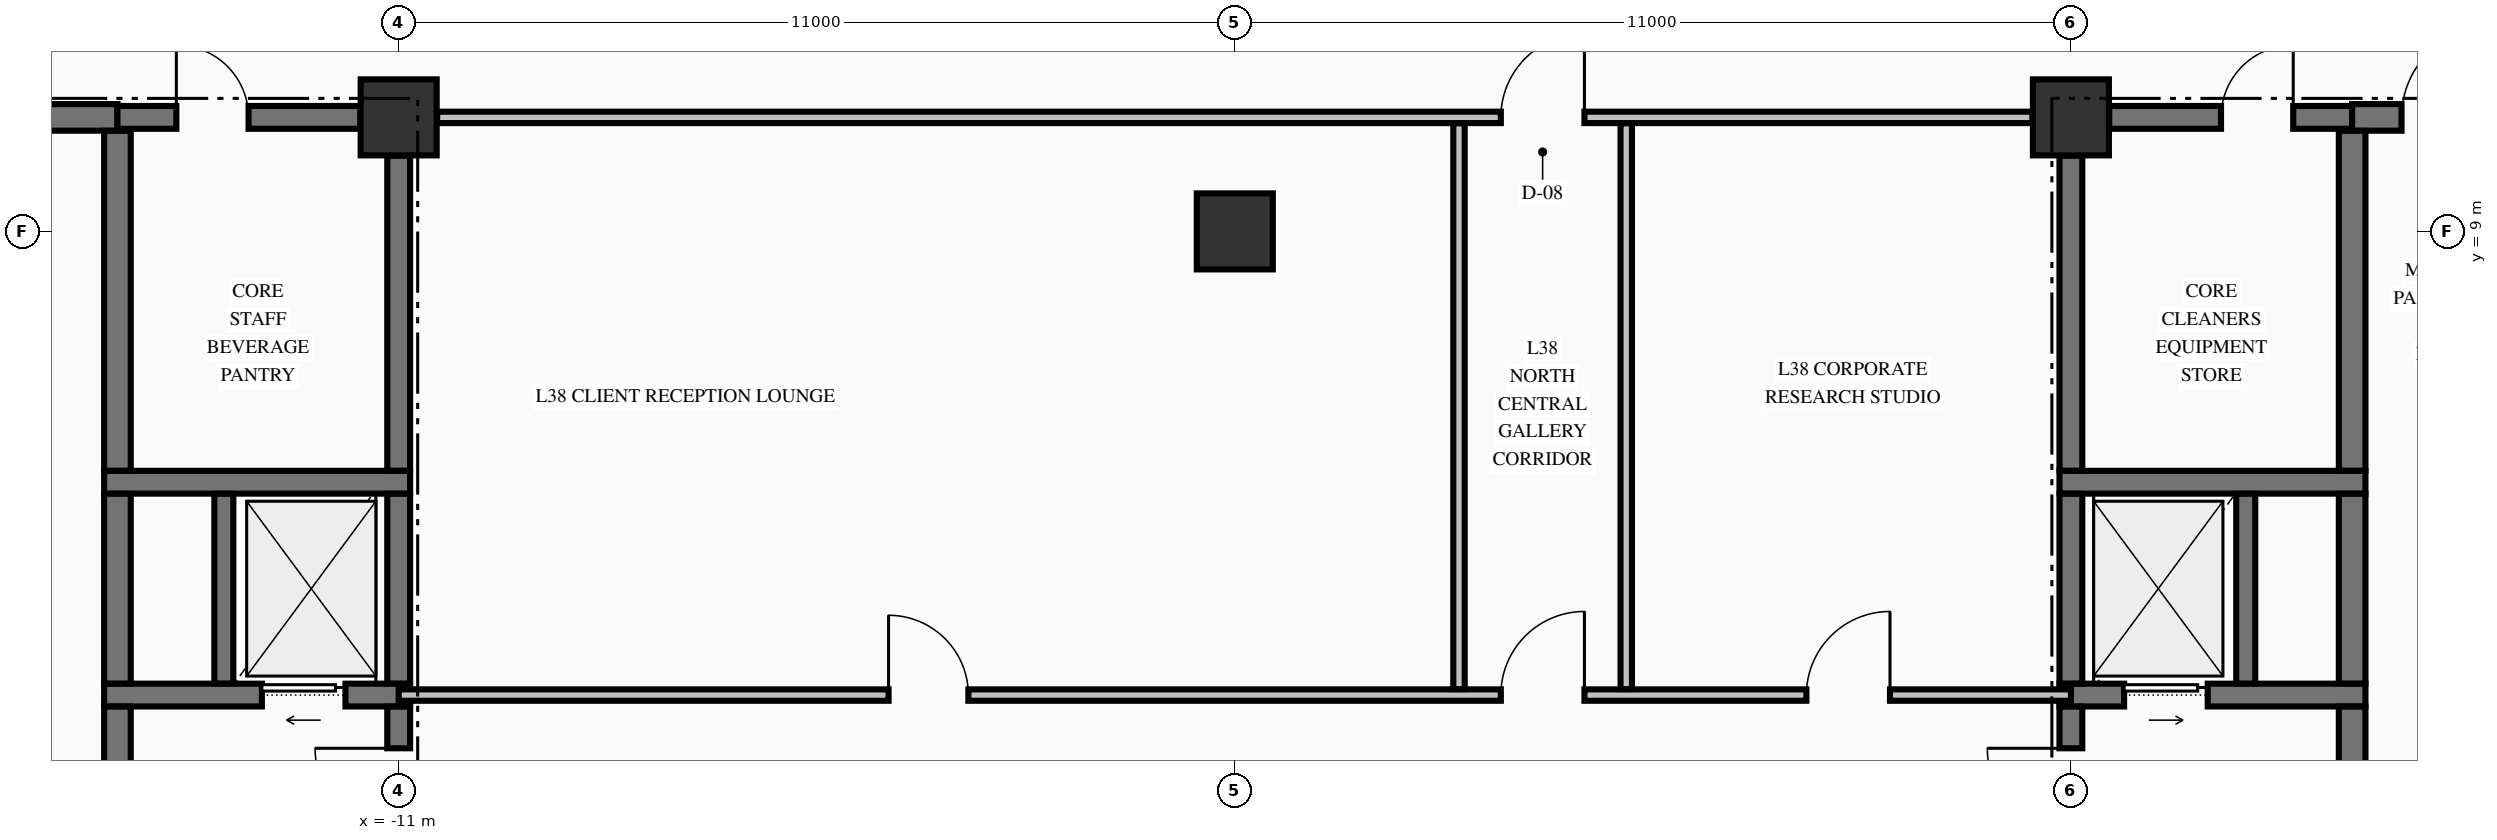
"""IFC4 building model, lengths in metres.
Left out: names, types, materials, properties, quantities, classifications, styles, units other than length and angle.
Written with IfcOpenShell. Run it as: python <this file> out.ifc"""

import sys

from ifc_helpers import new_model, si_unit, direction, frame, frame_2d, origin, origin_2d, place, context, subcontext, project, spatial, rectangle, extrude, element, fill, save


model = new_model("IFC4")
c1 = context("Model", 3, precision=1e-05, world=origin(), true_north=direction((0.0, 1.0)))
c2 = subcontext(c1, "Body", "Model", "MODEL_VIEW")
j1 = project(units=[si_unit("LENGTHUNIT", "METRE"), si_unit("PLANEANGLEUNIT", "RADIAN")], contexts=[c1])
p1 = place(None, origin())
s1 = spatial("IfcSite", under=j1, at=p1, CompositionType="ELEMENT")
p2 = place(p1, origin())
s2 = spatial("IfcBuilding", under=s1, at=p2, CompositionType="ELEMENT")
p3 = place(p2, frame((0.0, 0.0, 149.91)))
s3 = spatial("IfcBuildingStorey", under=s2, at=p3, CompositionType="ELEMENT", Elevation=149.91)
for number, where, z_axis, x_axis in (
    (1, (-11.0, 10.5, -0.25), (0.0, 0.0, 1.0), (1.0, 0.0, 0.0)),
    (2, (11.0, 10.5, -0.25), (0.0, 0.0, 1.0), (1.0, 0.0, 0.0)),
    (3, (0.0, 9.0, -0.25), (0.0, 0.0, 1.0), (1.0, 0.0, 0.0)),
):
    element("IfcColumn", number, at=place(p3, frame(where, z_axis=z_axis, x_axis=x_axis)), inside=s3, PredefinedType="COLUMN", context=c2, shape_type="SweptSolid", body=[
        extrude(rectangle(XDim=1.0, YDim=1.0, at=origin_2d()), origin(), (0.0, 0.0, 1.0), 3.395),
    ])
p4 = place(p3, frame((-14.875, 2.9, 0.0), z_axis=(0.0, 0.0, 1.0), x_axis=(1.0, 0.0, 0.0)))
e4 = element("IfcWall", 4, at=p4, inside=s3, PredefinedType="SHEAR", context=c2, shape_type="SweptSolid", body=[
    extrude(rectangle(XDim=4.025, YDim=0.3, at=frame_2d((2.012, 0.0))), origin(), (0.0, 0.0, 1.0), 3.145),
])
p5 = place(p4, frame((2.075, 0.0, 0.0)))
e5 = element("IfcOpeningElement", 5, at=p5, cuts=e4, PredefinedType="OPENING", context=c2, shape_type="SweptSolid", body=[
    extrude(rectangle(XDim=1.1, YDim=2.2, at=frame_2d((0.55, 1.1))), frame((0.0, 0.16, 0.0), z_axis=(0.0, -1.0, 0.0), x_axis=(1.0, 0.0, 0.0)), (0.0, 0.0, 1.0), 0.32),
])
p6 = place(p3, frame((10.85, 2.9, 0.0), z_axis=(0.0, 0.0, 1.0), x_axis=(1.0, 0.0, 0.0)))
e6 = element("IfcWall", 6, at=p6, inside=s3, PredefinedType="SHEAR", context=c2, shape_type="SweptSolid", body=[
    extrude(rectangle(XDim=4.025, YDim=0.3, at=frame_2d((2.012, 0.0))), origin(), (0.0, 0.0, 1.0), 3.145),
])
p7 = place(p6, frame((0.85, 0.0, 0.0)))
e7 = element("IfcOpeningElement", 7, at=p7, cuts=e6, PredefinedType="OPENING", context=c2, shape_type="SweptSolid", body=[
    extrude(rectangle(XDim=1.1, YDim=2.2, at=frame_2d((0.55, 1.1))), frame((0.0, 0.16, 0.0), z_axis=(0.0, -1.0, 0.0), x_axis=(1.0, 0.0, 0.0)), (0.0, 0.0, 1.0), 0.32),
])
for number, where, z_axis, x_axis in (
    (8, (-14.875, 5.7, 0.0), (0.0, 0.0, 1.0), (1.0, 0.0, 0.0)),
    (9, (10.85, 5.7, 0.0), (0.0, 0.0, 1.0), (1.0, 0.0, 0.0)),
):
    element("IfcWall", number, at=place(p3, frame(where, z_axis=z_axis, x_axis=x_axis)), inside=s3, PredefinedType="SHEAR", context=c2, shape_type="SweptSolid", body=[
        extrude(rectangle(XDim=4.025, YDim=0.3, at=frame_2d((2.012, 0.0))), origin(), (0.0, 0.0, 1.0), 3.145),
    ])
p8 = place(p3, frame((-19.496, 10.5, 0.0), z_axis=(0.0, 0.0, 1.0), x_axis=(1.0, 0.0, 0.0)))
e10 = element("IfcWall", 10, at=p8, inside=s3, PredefinedType="SHEAR", context=c2, shape_type="SweptSolid", body=[
    extrude(rectangle(XDim=4.796, YDim=0.35, at=frame_2d((2.398, 0.0))), origin(), (0.0, 0.0, 1.0), 3.145),
])
p9 = place(p8, frame((1.621, 0.0, 0.0)))
e11 = element("IfcOpeningElement", 11, at=p9, cuts=e10, PredefinedType="OPENING", context=c2, shape_type="SweptSolid", body=[
    extrude(rectangle(XDim=1.05, YDim=2.15, at=frame_2d((0.525, 1.075))), frame((0.0, 0.185, 0.0), z_axis=(0.0, -1.0, 0.0), x_axis=(1.0, 0.0, 0.0)), (0.0, 0.0, 1.0), 0.37),
])
p10 = place(p3, frame((-14.7, 10.5, 0.0), z_axis=(0.0, 0.0, 1.0), x_axis=(1.0, 0.0, 0.0)))
e12 = element("IfcWall", 12, at=p10, inside=s3, PredefinedType="SHEAR", context=c2, shape_type="SweptSolid", body=[
    extrude(rectangle(XDim=3.196, YDim=0.3, at=frame_2d((1.598, 0.0))), origin(), (0.0, 0.0, 1.0), 3.145),
])
p11 = place(p10, frame((0.775, 0.0, 0.0)))
e13 = element("IfcOpeningElement", 13, at=p11, cuts=e12, PredefinedType="OPENING", context=c2, shape_type="SweptSolid", body=[
    extrude(rectangle(XDim=0.95, YDim=2.15, at=frame_2d((0.475, 1.075))), frame((0.0, 0.16, 0.0), z_axis=(0.0, -1.0, 0.0), x_axis=(1.0, 0.0, 0.0)), (0.0, 0.0, 1.0), 0.32),
])
p12 = place(p3, frame((11.504, 10.5, 0.0), z_axis=(0.0, 0.0, 1.0), x_axis=(1.0, 0.0, 0.0)))
e14 = element("IfcWall", 14, at=p12, inside=s3, PredefinedType="SHEAR", context=c2, shape_type="SweptSolid", body=[
    extrude(rectangle(XDim=3.196, YDim=0.3, at=frame_2d((1.598, 0.0))), origin(), (0.0, 0.0, 1.0), 3.145),
])
p13 = place(p12, frame((1.471, 0.0, 0.0)))
e15 = element("IfcOpeningElement", 15, at=p13, cuts=e14, PredefinedType="OPENING", context=c2, shape_type="SweptSolid", body=[
    extrude(rectangle(XDim=0.95, YDim=2.15, at=frame_2d((0.475, 1.075))), frame((0.0, 0.16, 0.0), z_axis=(0.0, -1.0, 0.0), x_axis=(1.0, 0.0, 0.0)), (0.0, 0.0, 1.0), 0.32),
])
p14 = place(p3, frame((14.7, 10.5, 0.0), z_axis=(0.0, 0.0, 1.0), x_axis=(1.0, 0.0, 0.0)))
e16 = element("IfcWall", 16, at=p14, inside=s3, PredefinedType="SHEAR", context=c2, shape_type="SweptSolid", body=[
    extrude(rectangle(XDim=4.796, YDim=0.35, at=frame_2d((2.398, 0.0))), origin(), (0.0, 0.0, 1.0), 3.145),
])
p15 = place(p14, frame((0.65, 0.0, 0.0)))
e17 = element("IfcOpeningElement", 17, at=p15, cuts=e16, PredefinedType="OPENING", context=c2, shape_type="SweptSolid", body=[
    extrude(rectangle(XDim=1.2, YDim=2.15, at=frame_2d((0.6, 1.075))), frame((0.0, 0.185, 0.0), z_axis=(0.0, -1.0, 0.0), x_axis=(1.0, 0.0, 0.0)), (0.0, 0.0, 1.0), 0.37),
])
p16 = place(p14, frame((3.25, 0.0, 0.0)))
e18 = element("IfcOpeningElement", 18, at=p16, cuts=e16, PredefinedType="OPENING", context=c2, shape_type="SweptSolid", body=[
    extrude(rectangle(XDim=0.9, YDim=2.15, at=frame_2d((0.45, 1.075))), frame((0.0, 0.185, 0.0), z_axis=(0.0, -1.0, 0.0), x_axis=(1.0, 0.0, 0.0)), (0.0, 0.0, 1.0), 0.37),
])
p17 = place(p3, frame((-11.0, 2.9, 0.0), z_axis=(0.0, 0.0, 1.0), x_axis=(1.0, 0.0, 0.0)))
e19 = element("IfcWall", 19, at=p17, inside=s3, PredefinedType="PARTITIONING", context=c2, shape_type="SweptSolid", body=[
    extrude(rectangle(XDim=22.0, YDim=0.15, at=frame_2d((11.0, 0.0))), origin(), (0.0, 0.0, 1.0), 3.145),
])
p18 = place(p17, frame((14.5, 0.0, 0.0)))
e20 = element("IfcOpeningElement", 20, at=p18, cuts=e19, PredefinedType="OPENING", context=c2, shape_type="SweptSolid", body=[
    extrude(rectangle(XDim=1.1, YDim=2.15, at=frame_2d((0.55, 1.075))), frame((0.0, 0.085, 0.0), z_axis=(0.0, -1.0, 0.0), x_axis=(1.0, 0.0, 0.0)), (0.0, 0.0, 1.0), 0.17),
])
p19 = place(p17, frame((6.445, 0.0, 0.0)))
e21 = element("IfcOpeningElement", 21, at=p19, cuts=e19, PredefinedType="OPENING", context=c2, shape_type="SweptSolid", body=[
    extrude(rectangle(XDim=1.05, YDim=2.15, at=frame_2d((0.525, 1.075))), frame((0.0, 0.085, 0.0), z_axis=(0.0, -1.0, 0.0), x_axis=(1.0, 0.0, 0.0)), (0.0, 0.0, 1.0), 0.17),
])
p20 = place(p17, frame((18.52, 0.0, 0.0)))
e22 = element("IfcOpeningElement", 22, at=p20, cuts=e19, PredefinedType="OPENING", context=c2, shape_type="SweptSolid", body=[
    extrude(rectangle(XDim=1.1, YDim=2.15, at=frame_2d((0.55, 1.075))), frame((0.0, 0.085, 0.0), z_axis=(0.0, -1.0, 0.0), x_axis=(1.0, 0.0, 0.0)), (0.0, 0.0, 1.0), 0.17),
])
p21 = place(p3, frame((-10.494, 10.5, 0.0), z_axis=(0.0, 0.0, 1.0), x_axis=(1.0, 0.0, 0.0)))
e23 = element("IfcWall", 23, at=p21, inside=s3, PredefinedType="PARTITIONING", context=c2, shape_type="SweptSolid", body=[
    extrude(rectangle(XDim=20.988, YDim=0.15, at=frame_2d((10.494, 0.0))), origin(), (0.0, 0.0, 1.0), 3.145),
])
p22 = place(p21, frame((13.994, 0.0, 0.0)))
e24 = element("IfcOpeningElement", 24, at=p22, cuts=e23, PredefinedType="OPENING", context=c2, shape_type="SweptSolid", body=[
    extrude(rectangle(XDim=1.1, YDim=2.15, at=frame_2d((0.55, 1.075))), frame((0.0, 0.085, 0.0), z_axis=(0.0, -1.0, 0.0), x_axis=(1.0, 0.0, 0.0)), (0.0, 0.0, 1.0), 0.17),
])
p23 = place(p3, frame((-14.7, -0.098, 0.0), z_axis=(0.0, 0.0, 1.0), x_axis=(0.0, 1.0, 0.0)))
e25 = element("IfcWall", 25, at=p23, inside=s3, PredefinedType="SHEAR", context=c2, shape_type="SweptSolid", body=[
    extrude(rectangle(XDim=2.846, YDim=0.35, at=frame_2d((1.423, 0.0))), origin(), (0.0, 0.0, 1.0), 3.145),
])
p24 = place(p3, frame((-14.7, 3.052, 0.0), z_axis=(0.0, 0.0, 1.0), x_axis=(0.0, 1.0, 0.0)))
e26 = element("IfcWall", 26, at=p24, inside=s3, PredefinedType="SHEAR", context=c2, shape_type="SweptSolid", body=[
    extrude(rectangle(XDim=2.496, YDim=0.35, at=frame_2d((1.248, 0.0))), origin(), (0.0, 0.0, 1.0), 3.145),
])
p25 = place(p3, frame((-14.7, 5.852, 0.0), z_axis=(0.0, 0.0, 1.0), x_axis=(0.0, 1.0, 0.0)))
e27 = element("IfcWall", 27, at=p25, inside=s3, PredefinedType="SHEAR", context=c2, shape_type="SweptSolid", body=[
    extrude(rectangle(XDim=4.471, YDim=0.35, at=frame_2d((2.235, 0.0))), origin(), (0.0, 0.0, 1.0), 3.145),
])
p26 = place(p3, frame((-13.3, 3.052, 0.0), z_axis=(0.0, 0.0, 1.0), x_axis=(0.0, 1.0, 0.0)))
e28 = element("IfcWall", 28, at=p26, inside=s3, PredefinedType="SOLIDWALL", context=c2, shape_type="SweptSolid", body=[
    extrude(rectangle(XDim=2.496, YDim=0.25, at=frame_2d((1.248, 0.0))), origin(), (0.0, 0.0, 1.0), 3.145),
])
p27 = place(p3, frame((-11.0, 0.504, 0.0), z_axis=(0.0, 0.0, 1.0), x_axis=(0.0, 1.0, 0.0)))
e29 = element("IfcWall", 29, at=p27, inside=s3, PredefinedType="SHEAR", context=c2, shape_type="SweptSolid", body=[
    extrude(rectangle(XDim=2.244, YDim=0.3, at=frame_2d((1.122, 0.0))), origin(), (0.0, 0.0, 1.0), 3.145),
])
p28 = place(p27, frame((0.596, 0.0, 0.0)))
e30 = element("IfcOpeningElement", 30, at=p28, cuts=e29, PredefinedType="OPENING", context=c2, shape_type="SweptSolid", body=[
    extrude(rectangle(XDim=1.1, YDim=2.15, at=frame_2d((0.55, 1.075))), frame((0.0, 0.16, 0.0), z_axis=(0.0, -1.0, 0.0), x_axis=(1.0, 0.0, 0.0)), (0.0, 0.0, 1.0), 0.32),
])
p29 = place(p3, frame((-11.0, 3.052, 0.0), z_axis=(0.0, 0.0, 1.0), x_axis=(0.0, 1.0, 0.0)))
e31 = element("IfcWall", 31, at=p29, inside=s3, PredefinedType="SHEAR", context=c2, shape_type="SweptSolid", body=[
    extrude(rectangle(XDim=2.496, YDim=0.3, at=frame_2d((1.248, 0.0))), origin(), (0.0, 0.0, 1.0), 3.145),
])
p30 = place(p3, frame((-11.0, 5.852, 0.0), z_axis=(0.0, 0.0, 1.0), x_axis=(0.0, 1.0, 0.0)))
e32 = element("IfcWall", 32, at=p30, inside=s3, PredefinedType="SHEAR", context=c2, shape_type="SweptSolid", body=[
    extrude(rectangle(XDim=4.144, YDim=0.3, at=frame_2d((2.072, 0.0))), origin(), (0.0, 0.0, 1.0), 3.145),
])
p31 = place(p3, frame((11.0, 0.504, 0.0), z_axis=(0.0, 0.0, 1.0), x_axis=(0.0, 1.0, 0.0)))
e33 = element("IfcWall", 33, at=p31, inside=s3, PredefinedType="SHEAR", context=c2, shape_type="SweptSolid", body=[
    extrude(rectangle(XDim=2.244, YDim=0.3, at=frame_2d((1.122, 0.0))), origin(), (0.0, 0.0, 1.0), 3.145),
])
p32 = place(p31, frame((0.596, 0.0, 0.0)))
e34 = element("IfcOpeningElement", 34, at=p32, cuts=e33, PredefinedType="OPENING", context=c2, shape_type="SweptSolid", body=[
    extrude(rectangle(XDim=1.1, YDim=2.15, at=frame_2d((0.55, 1.075))), frame((0.0, 0.16, 0.0), z_axis=(0.0, -1.0, 0.0), x_axis=(1.0, 0.0, 0.0)), (0.0, 0.0, 1.0), 0.32),
])
p33 = place(p3, frame((11.0, 3.052, 0.0), z_axis=(0.0, 0.0, 1.0), x_axis=(0.0, 1.0, 0.0)))
e35 = element("IfcWall", 35, at=p33, inside=s3, PredefinedType="SHEAR", context=c2, shape_type="SweptSolid", body=[
    extrude(rectangle(XDim=2.496, YDim=0.3, at=frame_2d((1.248, 0.0))), origin(), (0.0, 0.0, 1.0), 3.145),
])
p34 = place(p3, frame((11.0, 5.852, 0.0), z_axis=(0.0, 0.0, 1.0), x_axis=(0.0, 1.0, 0.0)))
e36 = element("IfcWall", 36, at=p34, inside=s3, PredefinedType="SHEAR", context=c2, shape_type="SweptSolid", body=[
    extrude(rectangle(XDim=4.144, YDim=0.3, at=frame_2d((2.072, 0.0))), origin(), (0.0, 0.0, 1.0), 3.145),
])
p35 = place(p3, frame((13.3, 3.052, 0.0), z_axis=(0.0, 0.0, 1.0), x_axis=(0.0, 1.0, 0.0)))
e37 = element("IfcWall", 37, at=p35, inside=s3, PredefinedType="SOLIDWALL", context=c2, shape_type="SweptSolid", body=[
    extrude(rectangle(XDim=2.496, YDim=0.25, at=frame_2d((1.248, 0.0))), origin(), (0.0, 0.0, 1.0), 3.145),
])
p36 = place(p3, frame((14.7, -0.098, 0.0), z_axis=(0.0, 0.0, 1.0), x_axis=(0.0, 1.0, 0.0)))
e38 = element("IfcWall", 38, at=p36, inside=s3, PredefinedType="SHEAR", context=c2, shape_type="SweptSolid", body=[
    extrude(rectangle(XDim=2.846, YDim=0.35, at=frame_2d((1.423, 0.0))), origin(), (0.0, 0.0, 1.0), 3.145),
])
p37 = place(p3, frame((14.7, 3.052, 0.0), z_axis=(0.0, 0.0, 1.0), x_axis=(0.0, 1.0, 0.0)))
e39 = element("IfcWall", 39, at=p37, inside=s3, PredefinedType="SHEAR", context=c2, shape_type="SweptSolid", body=[
    extrude(rectangle(XDim=2.496, YDim=0.35, at=frame_2d((1.248, 0.0))), origin(), (0.0, 0.0, 1.0), 3.145),
])
p38 = place(p3, frame((14.7, 5.852, 0.0), z_axis=(0.0, 0.0, 1.0), x_axis=(0.0, 1.0, 0.0)))
e40 = element("IfcWall", 40, at=p38, inside=s3, PredefinedType="SHEAR", context=c2, shape_type="SweptSolid", body=[
    extrude(rectangle(XDim=4.471, YDim=0.35, at=frame_2d((2.235, 0.0))), origin(), (0.0, 0.0, 1.0), 3.145),
])
for number, where, z_axis, x_axis in (
    (41, (2.95, 2.978, 0.0), (0.0, 0.0, 1.0), (0.0, 1.0, 0.0)),
    (42, (5.15, 2.978, 0.0), (0.0, 0.0, 1.0), (0.0, 1.0, 0.0)),
):
    element("IfcWall", number, at=place(p3, frame(where, z_axis=z_axis, x_axis=x_axis)), inside=s3, PredefinedType="PARTITIONING", context=c2, shape_type="SweptSolid", body=[
        extrude(rectangle(XDim=7.444, YDim=0.15, at=frame_2d((3.722, 0.0))), origin(), (0.0, 0.0, 1.0), 3.145),
    ])
p39 = place(p28, origin())
e43 = element("IfcDoor", 43, at=p39, inside=s3, OperationType="SINGLE_SWING_RIGHT", PredefinedType="DOOR", context=c2, shape_type="SweptSolid", body=[
    extrude(rectangle(XDim=1.1, YDim=2.15, at=frame_2d((0.55, 1.075))), frame((0.0, 0.025, 0.0), z_axis=(0.0, -1.0, 0.0), x_axis=(1.0, 0.0, 0.0)), (0.0, 0.0, 1.0), 0.05),
])
fill(e30, e43)
p40 = place(p5, origin())
e44 = element("IfcDoor", 44, at=p40, inside=s3, OperationType="SLIDING_TO_LEFT", PredefinedType="DOOR", context=c2, shape_type="SweptSolid", body=[
    extrude(rectangle(XDim=1.1, YDim=2.2, at=frame_2d((0.55, 1.1))), frame((0.0, 0.025, 0.0), z_axis=(0.0, -1.0, 0.0), x_axis=(1.0, 0.0, 0.0)), (0.0, 0.0, 1.0), 0.05),
])
fill(e5, e44)
p41 = place(p32, origin())
e45 = element("IfcDoor", 45, at=p41, inside=s3, OperationType="SINGLE_SWING_RIGHT", PredefinedType="DOOR", context=c2, shape_type="SweptSolid", body=[
    extrude(rectangle(XDim=1.1, YDim=2.15, at=frame_2d((0.55, 1.075))), frame((0.0, 0.025, 0.0), z_axis=(0.0, -1.0, 0.0), x_axis=(1.0, 0.0, 0.0)), (0.0, 0.0, 1.0), 0.05),
])
fill(e34, e45)
p42 = place(p7, origin())
e46 = element("IfcDoor", 46, at=p42, inside=s3, OperationType="SLIDING_TO_RIGHT", PredefinedType="DOOR", context=c2, shape_type="SweptSolid", body=[
    extrude(rectangle(XDim=1.1, YDim=2.2, at=frame_2d((0.55, 1.1))), frame((0.0, 0.025, 0.0), z_axis=(0.0, -1.0, 0.0), x_axis=(1.0, 0.0, 0.0)), (0.0, 0.0, 1.0), 0.05),
])
fill(e7, e46)
p43 = place(p11, origin())
e47 = element("IfcDoor", 47, at=p43, inside=s3, OperationType="SINGLE_SWING_LEFT", PredefinedType="DOOR", context=c2, shape_type="SweptSolid", body=[
    extrude(rectangle(XDim=0.95, YDim=2.15, at=frame_2d((0.475, 1.075))), frame((0.0, 0.025, 0.0), z_axis=(0.0, -1.0, 0.0), x_axis=(1.0, 0.0, 0.0)), (0.0, 0.0, 1.0), 0.05),
])
fill(e13, e47)
p44 = place(p13, origin())
e48 = element("IfcDoor", 48, at=p44, inside=s3, OperationType="SINGLE_SWING_RIGHT", PredefinedType="DOOR", context=c2, shape_type="SweptSolid", body=[
    extrude(rectangle(XDim=0.95, YDim=2.15, at=frame_2d((0.475, 1.075))), frame((0.0, 0.025, 0.0), z_axis=(0.0, -1.0, 0.0), x_axis=(1.0, 0.0, 0.0)), (0.0, 0.0, 1.0), 0.05),
])
fill(e15, e48)
p45 = place(p15, origin())
e49 = element("IfcDoor", 49, at=p45, inside=s3, OperationType="SINGLE_SWING_RIGHT", PredefinedType="DOOR", context=c2, shape_type="SweptSolid", body=[
    extrude(rectangle(XDim=1.2, YDim=2.15, at=frame_2d((0.6, 1.075))), frame((0.0, 0.025, 0.0), z_axis=(0.0, -1.0, 0.0), x_axis=(1.0, 0.0, 0.0)), (0.0, 0.0, 1.0), 0.05),
])
fill(e17, e49)
p46 = place(p22, origin())
e50 = element("IfcDoor", 50, at=p46, inside=s3, OperationType="SINGLE_SWING_RIGHT", PredefinedType="DOOR", context=c2, shape_type="SweptSolid", body=[
    extrude(rectangle(XDim=1.1, YDim=2.15, at=frame_2d((0.55, 1.075))), frame((0.0, 0.025, 0.0), z_axis=(0.0, -1.0, 0.0), x_axis=(1.0, 0.0, 0.0)), (0.0, 0.0, 1.0), 0.05),
])
fill(e24, e50)
p47 = place(p18, origin())
e51 = element("IfcDoor", 51, at=p47, inside=s3, OperationType="SINGLE_SWING_RIGHT", PredefinedType="DOOR", context=c2, shape_type="SweptSolid", body=[
    extrude(rectangle(XDim=1.1, YDim=2.15, at=frame_2d((0.55, 1.075))), frame((0.0, 0.025, 0.0), z_axis=(0.0, -1.0, 0.0), x_axis=(1.0, 0.0, 0.0)), (0.0, 0.0, 1.0), 0.05),
])
fill(e20, e51)
p48 = place(p19, origin())
e52 = element("IfcDoor", 52, at=p48, inside=s3, OperationType="SINGLE_SWING_LEFT", PredefinedType="DOOR", context=c2, shape_type="SweptSolid", body=[
    extrude(rectangle(XDim=1.05, YDim=2.15, at=frame_2d((0.525, 1.075))), frame((0.0, 0.025, 0.0), z_axis=(0.0, -1.0, 0.0), x_axis=(1.0, 0.0, 0.0)), (0.0, 0.0, 1.0), 0.05),
])
fill(e21, e52)
p49 = place(p20, origin())
e53 = element("IfcDoor", 53, at=p49, inside=s3, OperationType="SINGLE_SWING_RIGHT", PredefinedType="DOOR", context=c2, shape_type="SweptSolid", body=[
    extrude(rectangle(XDim=1.1, YDim=2.15, at=frame_2d((0.55, 1.075))), frame((0.0, 0.025, 0.0), z_axis=(0.0, -1.0, 0.0), x_axis=(1.0, 0.0, 0.0)), (0.0, 0.0, 1.0), 0.05),
])
fill(e22, e53)
save(model, sys.argv[1])
